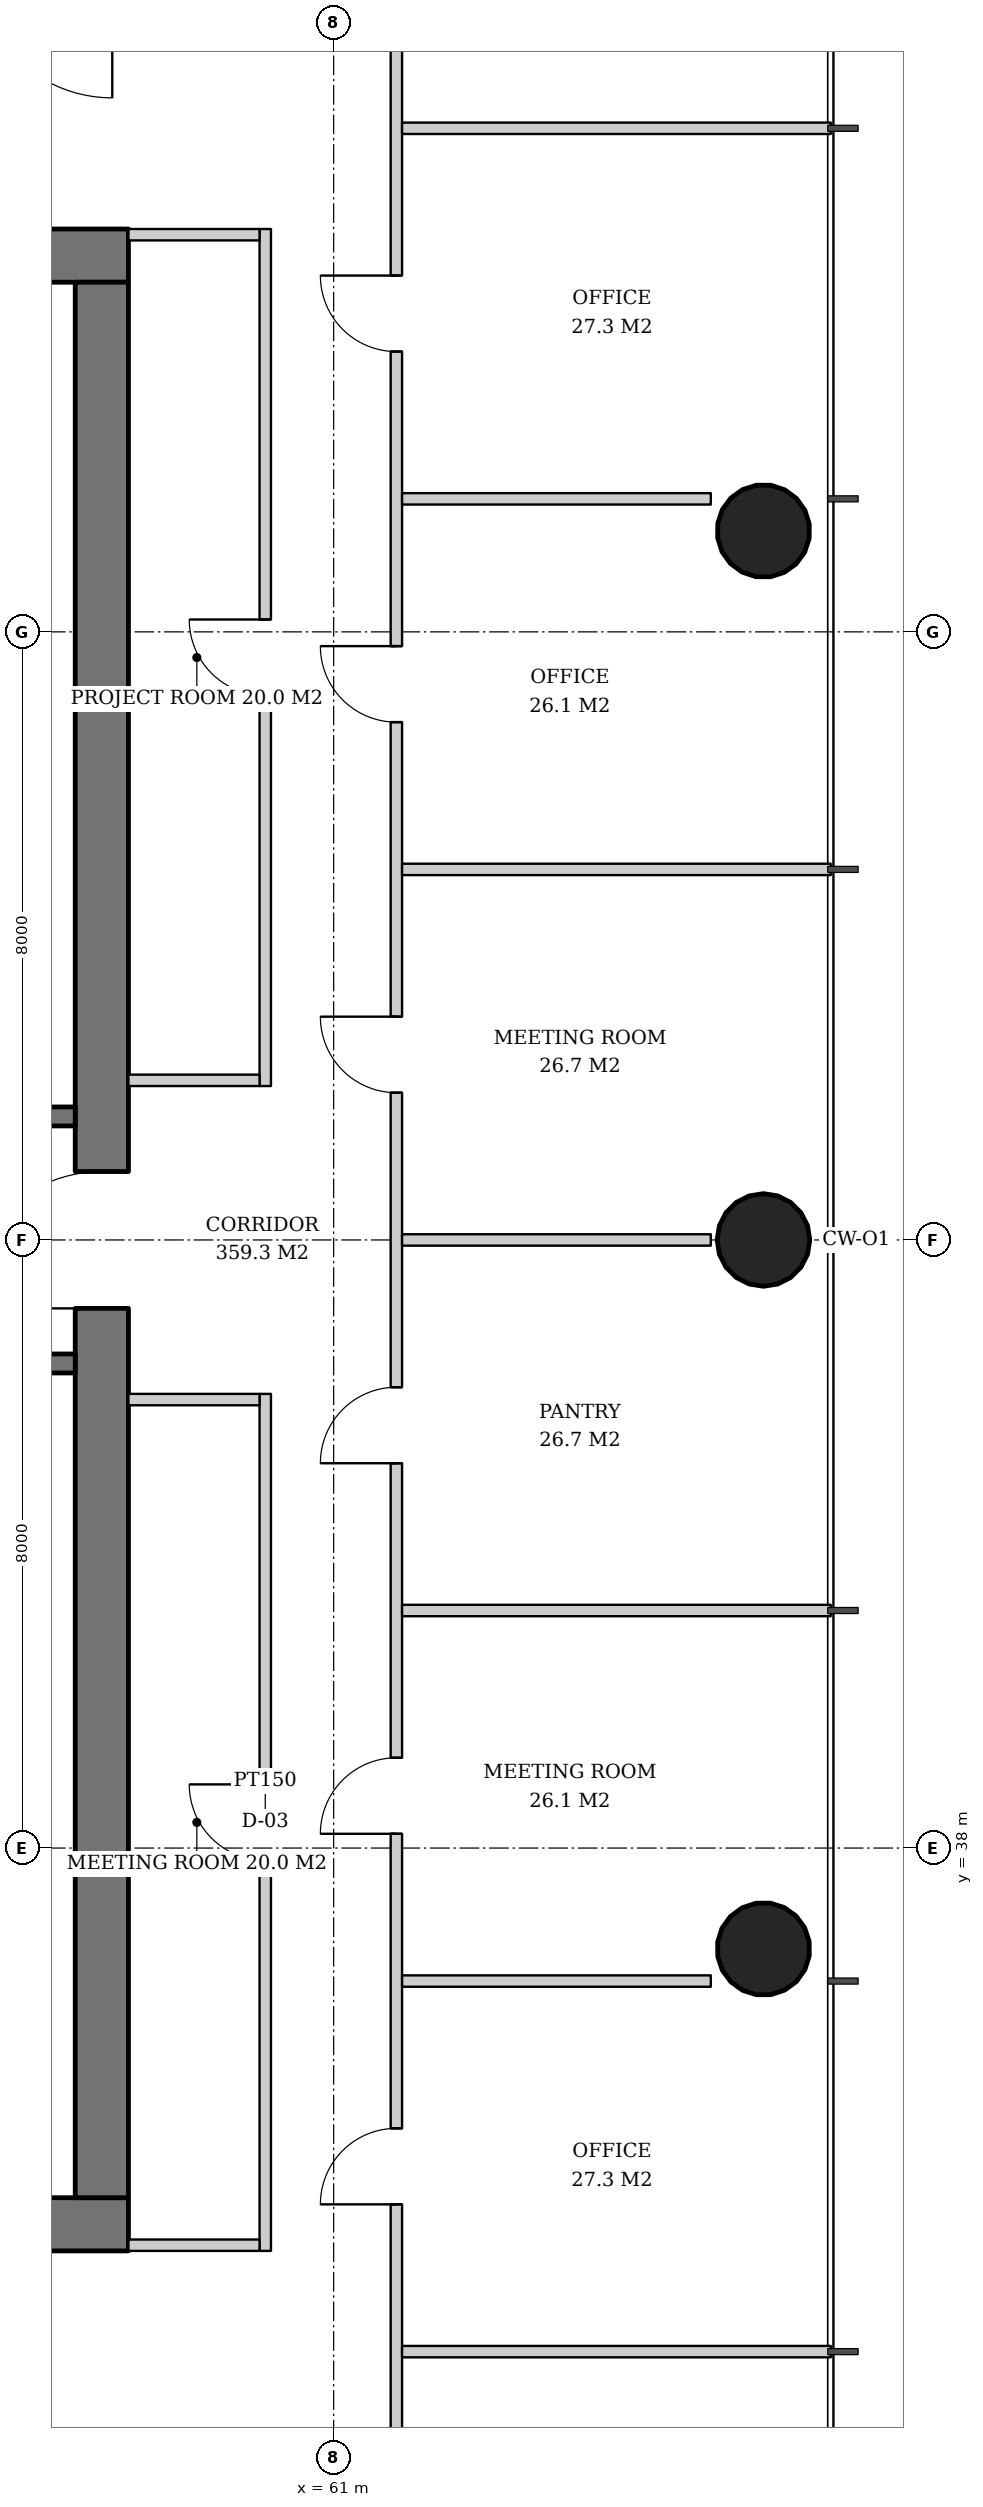
"""IFC4 building model, lengths in metres.
Left out: names, types, materials, properties, quantities, classifications, styles, units other than length and angle.
Written with IfcOpenShell. Run it as: python <this file> out.ifc"""

import sys

from ifc_helpers import new_model, si_unit, direction, frame, frame_2d, origin, origin_2d, place, context, subcontext, project, spatial, rectangle, hollow_circle, extrude, element, fill, save


model = new_model("IFC4")
c1 = context("Model", 3, precision=1e-05, world=origin(), true_north=direction((0.0, 1.0)))
c2 = subcontext(c1, "Body", "Model", "MODEL_VIEW")
j1 = project(units=[si_unit("LENGTHUNIT", "METRE"), si_unit("PLANEANGLEUNIT", "RADIAN")], contexts=[c1])
p1 = place(None, origin())
s1 = spatial("IfcSite", under=j1, at=p1, CompositionType="ELEMENT")
p2 = place(p1, origin())
s2 = spatial("IfcBuilding", under=s1, at=p2, CompositionType="ELEMENT")
p3 = place(p2, frame((0.0, 0.0, 93.2)))
s3 = spatial("IfcBuildingStorey", under=s2, at=p3, CompositionType="ELEMENT", Elevation=93.2)
p4 = place(p3, frame((66.693, 36.654, 0.0), z_axis=(-0.031910269556, 0.015987237665, 0.999362868496), x_axis=(-0.447933021895, -0.894067115991, 0.0)))
e1 = element("IfcColumn", 1, at=p4, inside=s3, PredefinedType="COLUMN", context=c2, shape_type="SweptSolid", body=[
    extrude(hollow_circle(Radius=0.61, WallThickness=0.04, at=origin_2d()), origin(), (0.0, 0.0, 1.0), 3.802),
])
p5 = place(p3, frame((66.693, 46.0, 0.0), z_axis=(-0.031914348339, 0.0, 0.999490607445), x_axis=(0.0, -1.0, 0.0)))
e2 = element("IfcColumn", 2, at=p5, inside=s3, PredefinedType="COLUMN", context=c2, shape_type="SweptSolid", body=[
    extrude(hollow_circle(Radius=0.61, WallThickness=0.04, at=origin_2d()), origin(), (0.0, 0.0, 1.0), 3.802),
])
p6 = place(p3, frame((66.693, 55.346, 0.0), z_axis=(-0.031910269556, -0.015987237665, 0.999362868496), x_axis=(0.447933021895, -0.894067115991, 0.0)))
e3 = element("IfcColumn", 3, at=p6, inside=s3, PredefinedType="COLUMN", context=c2, shape_type="SweptSolid", body=[
    extrude(hollow_circle(Radius=0.61, WallThickness=0.04, at=origin_2d()), origin(), (0.0, 0.0, 1.0), 3.802),
])
p7 = place(p3, frame((31.7, 33.05, 0.0), z_axis=(0.0, 0.0, 1.0), x_axis=(1.0, 0.0, 0.0)))
e4 = element("IfcWall", 4, at=p7, inside=s3, PredefinedType="SHEAR", context=c2, shape_type="SweptSolid", body=[
    extrude(rectangle(XDim=26.6, YDim=0.7, at=frame_2d((13.3, 0.0))), origin(), (0.0, 0.0, 1.0), 3.8),
])
p8 = place(p7, frame((7.3, 0.0, 0.0)))
e5 = element("IfcOpeningElement", 5, at=p8, cuts=e4, PredefinedType="OPENING", context=c2, shape_type="SweptSolid", body=[
    extrude(rectangle(XDim=1.0, YDim=2.1, at=frame_2d((0.5, 1.05))), frame((0.0, 0.36, 0.0), z_axis=(0.0, -1.0, 0.0), x_axis=(1.0, 0.0, 0.0)), (0.0, 0.0, 1.0), 0.72),
])
p9 = place(p7, frame((18.75, 0.0, 0.0)))
e6 = element("IfcOpeningElement", 6, at=p9, cuts=e4, PredefinedType="OPENING", context=c2, shape_type="SweptSolid", body=[
    extrude(rectangle(XDim=1.0, YDim=2.1, at=frame_2d((0.5, 1.05))), frame((0.0, 0.36, 0.0), z_axis=(0.0, -1.0, 0.0), x_axis=(1.0, 0.0, 0.0)), (0.0, 0.0, 1.0), 0.72),
])
p10 = place(p7, frame((1.85, 0.0, 0.0)))
e7 = element("IfcOpeningElement", 7, at=p10, cuts=e4, PredefinedType="OPENING", context=c2, shape_type="SweptSolid", body=[
    extrude(rectangle(XDim=1.0, YDim=2.1, at=frame_2d((0.5, 1.05))), frame((0.0, 0.36, 0.0), z_axis=(0.0, -1.0, 0.0), x_axis=(1.0, 0.0, 0.0)), (0.0, 0.0, 1.0), 0.72),
])
p11 = place(p7, frame((4.7, 0.0, 0.0)))
e8 = element("IfcOpeningElement", 8, at=p11, cuts=e4, PredefinedType="OPENING", context=c2, shape_type="SweptSolid", body=[
    extrude(rectangle(XDim=1.0, YDim=2.1, at=frame_2d((0.5, 1.05))), frame((0.0, 0.36, 0.0), z_axis=(0.0, -1.0, 0.0), x_axis=(1.0, 0.0, 0.0)), (0.0, 0.0, 1.0), 0.72),
])
p12 = place(p7, frame((12.44, 0.0, 0.0)))
e9 = element("IfcOpeningElement", 9, at=p12, cuts=e4, PredefinedType="OPENING", context=c2, shape_type="SweptSolid", body=[
    extrude(rectangle(XDim=1.0, YDim=2.1, at=frame_2d((0.5, 1.05))), frame((0.0, 0.36, 0.0), z_axis=(0.0, -1.0, 0.0), x_axis=(1.0, 0.0, 0.0)), (0.0, 0.0, 1.0), 0.72),
])
p13 = place(p7, frame((20.644, 0.0, 0.0)))
e10 = element("IfcOpeningElement", 10, at=p13, cuts=e4, PredefinedType="OPENING", context=c2, shape_type="SweptSolid", body=[
    extrude(rectangle(XDim=1.0, YDim=2.1, at=frame_2d((0.5, 1.05))), frame((0.0, 0.36, 0.0), z_axis=(0.0, -1.0, 0.0), x_axis=(1.0, 0.0, 0.0)), (0.0, 0.0, 1.0), 0.72),
])
p14 = place(p7, frame((23.544, 0.0, 0.0)))
e11 = element("IfcOpeningElement", 11, at=p14, cuts=e4, PredefinedType="OPENING", context=c2, shape_type="SweptSolid", body=[
    extrude(rectangle(XDim=1.0, YDim=2.1, at=frame_2d((0.5, 1.05))), frame((0.0, 0.36, 0.0), z_axis=(0.0, -1.0, 0.0), x_axis=(1.0, 0.0, 0.0)), (0.0, 0.0, 1.0), 0.72),
])
p15 = place(p3, frame((31.7, 58.95, 0.0), z_axis=(0.0, 0.0, 1.0), x_axis=(1.0, 0.0, 0.0)))
e12 = element("IfcWall", 12, at=p15, inside=s3, PredefinedType="SHEAR", context=c2, shape_type="SweptSolid", body=[
    extrude(rectangle(XDim=26.6, YDim=0.7, at=frame_2d((13.3, 0.0))), origin(), (0.0, 0.0, 1.0), 3.8),
])
p16 = place(p15, frame((17.94, 0.0, 0.0)))
e13 = element("IfcOpeningElement", 13, at=p16, cuts=e12, PredefinedType="OPENING", context=c2, shape_type="SweptSolid", body=[
    extrude(rectangle(XDim=1.0, YDim=2.1, at=frame_2d((0.5, 1.05))), frame((0.0, 0.36, 0.0), z_axis=(0.0, -1.0, 0.0), x_axis=(1.0, 0.0, 0.0)), (0.0, 0.0, 1.0), 0.72),
])
p17 = place(p15, frame((5.825, 0.0, 0.0)))
e14 = element("IfcOpeningElement", 14, at=p17, cuts=e12, PredefinedType="OPENING", context=c2, shape_type="SweptSolid", body=[
    extrude(rectangle(XDim=1.0, YDim=2.1, at=frame_2d((0.5, 1.05))), frame((0.0, 0.36, 0.0), z_axis=(0.0, -1.0, 0.0), x_axis=(1.0, 0.0, 0.0)), (0.0, 0.0, 1.0), 0.72),
])
p18 = place(p15, frame((2.587, 0.0, 0.0)))
e15 = element("IfcOpeningElement", 15, at=p18, cuts=e12, PredefinedType="OPENING", context=c2, shape_type="SweptSolid", body=[
    extrude(rectangle(XDim=1.0, YDim=2.1, at=frame_2d((0.5, 1.05))), frame((0.0, 0.36, 0.0), z_axis=(0.0, -1.0, 0.0), x_axis=(1.0, 0.0, 0.0)), (0.0, 0.0, 1.0), 0.72),
])
p19 = place(p15, frame((9.126, 0.0, 0.0)))
e16 = element("IfcOpeningElement", 16, at=p19, cuts=e12, PredefinedType="OPENING", context=c2, shape_type="SweptSolid", body=[
    extrude(rectangle(XDim=1.0, YDim=2.1, at=frame_2d((0.5, 1.05))), frame((0.0, 0.36, 0.0), z_axis=(0.0, -1.0, 0.0), x_axis=(1.0, 0.0, 0.0)), (0.0, 0.0, 1.0), 0.72),
])
p20 = place(p15, frame((14.029, 0.0, 0.0)))
e17 = element("IfcOpeningElement", 17, at=p20, cuts=e12, PredefinedType="OPENING", context=c2, shape_type="SweptSolid", body=[
    extrude(rectangle(XDim=1.0, YDim=2.1, at=frame_2d((0.5, 1.05))), frame((0.0, 0.36, 0.0), z_axis=(0.0, -1.0, 0.0), x_axis=(1.0, 0.0, 0.0)), (0.0, 0.0, 1.0), 0.72),
])
p21 = place(p15, frame((22.4, 0.0, 0.0)))
e18 = element("IfcOpeningElement", 18, at=p21, cuts=e12, PredefinedType="OPENING", context=c2, shape_type="SweptSolid", body=[
    extrude(rectangle(XDim=1.0, YDim=2.1, at=frame_2d((0.5, 1.05))), frame((0.0, 0.36, 0.0), z_axis=(0.0, -1.0, 0.0), x_axis=(1.0, 0.0, 0.0)), (0.0, 0.0, 1.0), 0.72),
])
p22 = place(p3, frame((57.95, 33.4, 0.0), z_axis=(0.0, 0.0, 1.0), x_axis=(0.0, 1.0, 0.0)))
e19 = element("IfcWall", 19, at=p22, inside=s3, PredefinedType="SHEAR", context=c2, shape_type="SweptSolid", body=[
    extrude(rectangle(XDim=25.2, YDim=0.7, at=frame_2d((12.6, 0.0))), origin(), (0.0, 0.0, 1.0), 3.8),
])
p23 = place(p22, frame((11.7, 0.0, 0.0)))
e20 = element("IfcOpeningElement", 20, at=p23, cuts=e19, PredefinedType="OPENING", context=c2, shape_type="SweptSolid", body=[
    extrude(rectangle(XDim=1.8, YDim=2.4, at=frame_2d((0.9, 1.2))), frame((0.0, 0.36, 0.0), z_axis=(0.0, -1.0, 0.0), x_axis=(1.0, 0.0, 0.0)), (0.0, 0.0, 1.0), 0.72),
])
for number, where, z_axis, x_axis in (
    (21, (54.9, 44.375, 0.0), (0.0, 0.0, 1.0), (1.0, 0.0, 0.0)),
    (22, (54.9, 47.625, 0.0), (0.0, 0.0, 1.0), (1.0, 0.0, 0.0)),
):
    element("IfcWall", number, at=place(p3, frame(where, z_axis=z_axis, x_axis=x_axis)), inside=s3, PredefinedType="SOLIDWALL", context=c2, shape_type="SweptSolid", body=[
        extrude(rectangle(XDim=2.7, YDim=0.25, at=frame_2d((1.35, 0.0))), origin(), (0.0, 0.0, 1.0), 3.62),
    ])
p24 = place(p3, frame((60.1, 32.7, 0.0), z_axis=(0.0, 0.0, 1.0), x_axis=(0.0, 1.0, 0.0)))
e23 = element("IfcWall", 23, at=p24, inside=s3, PredefinedType="PARTITIONING", context=c2, shape_type="SweptSolid", body=[
    extrude(rectangle(XDim=11.275, YDim=0.15, at=frame_2d((5.638, 0.0))), origin(), (0.0, 0.0, 1.0), 2.72),
])
p25 = place(p24, frame((5.137, 0.0, 0.0)))
e24 = element("IfcOpeningElement", 24, at=p25, cuts=e23, PredefinedType="OPENING", context=c2, shape_type="SweptSolid", body=[
    extrude(rectangle(XDim=1.0, YDim=2.1, at=frame_2d((0.5, 1.05))), frame((0.0, 0.085, 0.0), z_axis=(0.0, -1.0, 0.0), x_axis=(1.0, 0.0, 0.0)), (0.0, 0.0, 1.0), 0.17),
])
for number, where, z_axis, x_axis in (
    (25, (58.3, 32.775, 0.0), (0.0, 0.0, 1.0), (1.0, 0.0, 0.0)),
    (26, (58.3, 43.9, 0.0), (0.0, 0.0, 1.0), (1.0, 0.0, 0.0)),
):
    element("IfcWall", number, at=place(p3, frame(where, z_axis=z_axis, x_axis=x_axis)), inside=s3, PredefinedType="PARTITIONING", context=c2, shape_type="SweptSolid", body=[
        extrude(rectangle(XDim=1.725, YDim=0.15, at=frame_2d((0.862, 0.0))), origin(), (0.0, 0.0, 1.0), 3.62),
    ])
p26 = place(p3, frame((60.1, 48.025, 0.0), z_axis=(0.0, 0.0, 1.0), x_axis=(0.0, 1.0, 0.0)))
e27 = element("IfcWall", 27, at=p26, inside=s3, PredefinedType="PARTITIONING", context=c2, shape_type="SweptSolid", body=[
    extrude(rectangle(XDim=11.275, YDim=0.15, at=frame_2d((5.638, 0.0))), origin(), (0.0, 0.0, 1.0), 2.806),
])
p27 = place(p26, frame((5.137, 0.0, 0.0)))
e28 = element("IfcOpeningElement", 28, at=p27, cuts=e27, PredefinedType="OPENING", context=c2, shape_type="SweptSolid", body=[
    extrude(rectangle(XDim=1.0, YDim=2.1, at=frame_2d((0.5, 1.05))), frame((0.0, 0.085, 0.0), z_axis=(0.0, -1.0, 0.0), x_axis=(1.0, 0.0, 0.0)), (0.0, 0.0, 1.0), 0.17),
])
for number, where, z_axis, x_axis in (
    (29, (58.3, 48.1, 0.0), (0.0, 0.0, 1.0), (1.0, 0.0, 0.0)),
    (30, (58.3, 59.225, 0.0), (0.0, 0.0, 1.0), (1.0, 0.0, 0.0)),
):
    element("IfcWall", number, at=place(p3, frame(where, z_axis=z_axis, x_axis=x_axis)), inside=s3, PredefinedType="PARTITIONING", context=c2, shape_type="SweptSolid", body=[
        extrude(rectangle(XDim=1.725, YDim=0.15, at=frame_2d((0.862, 0.0))), origin(), (0.0, 0.0, 1.0), 3.62),
    ])
p28 = place(p3, frame((61.825, 29.796, 0.0), z_axis=(0.0, 0.0, 1.0), x_axis=(0.0, 1.0, 0.0)))
e31 = element("IfcWall", 31, at=p28, inside=s3, PredefinedType="PARTITIONING", context=c2, shape_type="SweptSolid", body=[
    extrude(rectangle(XDim=32.409, YDim=0.15, at=frame_2d((16.204, 0.0))), origin(), (0.0, 0.0, 1.0), 2.72),
])
p29 = place(p28, frame((3.517, 0.0, 0.0)))
e32 = element("IfcOpeningElement", 32, at=p29, cuts=e31, PredefinedType="OPENING", context=c2, shape_type="SweptSolid", body=[
    extrude(rectangle(XDim=1.0, YDim=2.1, at=frame_2d((0.5, 1.05))), frame((0.0, 0.085, 0.0), z_axis=(0.0, -1.0, 0.0), x_axis=(1.0, 0.0, 0.0)), (0.0, 0.0, 1.0), 0.17),
])
p30 = place(p28, frame((8.392, 0.0, 0.0)))
e33 = element("IfcOpeningElement", 33, at=p30, cuts=e31, PredefinedType="OPENING", context=c2, shape_type="SweptSolid", body=[
    extrude(rectangle(XDim=1.0, YDim=2.1, at=frame_2d((0.5, 1.05))), frame((0.0, 0.085, 0.0), z_axis=(0.0, -1.0, 0.0), x_axis=(1.0, 0.0, 0.0)), (0.0, 0.0, 1.0), 0.17),
])
p31 = place(p28, frame((13.267, 0.0, 0.0)))
e34 = element("IfcOpeningElement", 34, at=p31, cuts=e31, PredefinedType="OPENING", context=c2, shape_type="SweptSolid", body=[
    extrude(rectangle(XDim=1.0, YDim=2.1, at=frame_2d((0.5, 1.05))), frame((0.0, 0.085, 0.0), z_axis=(0.0, -1.0, 0.0), x_axis=(1.0, 0.0, 0.0)), (0.0, 0.0, 1.0), 0.17),
])
p32 = place(p28, frame((18.142, 0.0, 0.0)))
e35 = element("IfcOpeningElement", 35, at=p32, cuts=e31, PredefinedType="OPENING", context=c2, shape_type="SweptSolid", body=[
    extrude(rectangle(XDim=1.0, YDim=2.1, at=frame_2d((0.5, 1.05))), frame((0.0, 0.085, 0.0), z_axis=(0.0, -1.0, 0.0), x_axis=(1.0, 0.0, 0.0)), (0.0, 0.0, 1.0), 0.17),
])
p33 = place(p28, frame((23.017, 0.0, 0.0)))
e36 = element("IfcOpeningElement", 36, at=p33, cuts=e31, PredefinedType="OPENING", context=c2, shape_type="SweptSolid", body=[
    extrude(rectangle(XDim=1.0, YDim=2.1, at=frame_2d((0.5, 1.05))), frame((0.0, 0.085, 0.0), z_axis=(0.0, -1.0, 0.0), x_axis=(1.0, 0.0, 0.0)), (0.0, 0.0, 1.0), 0.17),
])
p34 = place(p28, frame((27.892, 0.0, 0.0)))
e37 = element("IfcOpeningElement", 37, at=p34, cuts=e31, PredefinedType="OPENING", context=c2, shape_type="SweptSolid", body=[
    extrude(rectangle(XDim=1.0, YDim=2.1, at=frame_2d((0.5, 1.05))), frame((0.0, 0.085, 0.0), z_axis=(0.0, -1.0, 0.0), x_axis=(1.0, 0.0, 0.0)), (0.0, 0.0, 1.0), 0.17),
])
p35 = place(p3, frame((61.9, 31.375, 0.0), z_axis=(0.0, 0.0, 1.0), x_axis=(1.0, 0.0, 0.0)))
e38 = element("IfcWall", 38, at=p35, inside=s3, PredefinedType="PARTITIONING", context=c2, shape_type="SweptSolid", body=[
    extrude(rectangle(XDim=5.64, YDim=0.15, at=frame_2d((2.82, 0.0))), origin(), (0.0, 0.0, 1.0), 2.82),
])
p36 = place(p3, frame((61.9, 36.25, 0.0), z_axis=(0.0, 0.0, 1.0), x_axis=(1.0, 0.0, 0.0)))
e39 = element("IfcWall", 39, at=p36, inside=s3, PredefinedType="PARTITIONING", context=c2, shape_type="SweptSolid", body=[
    extrude(rectangle(XDim=4.062, YDim=0.15, at=frame_2d((2.031, 0.0))), origin(), (0.0, 0.0, 1.0), 3.62),
])
p37 = place(p3, frame((61.9, 41.125, 0.0), z_axis=(0.0, 0.0, 1.0), x_axis=(1.0, 0.0, 0.0)))
e40 = element("IfcWall", 40, at=p37, inside=s3, PredefinedType="PARTITIONING", context=c2, shape_type="SweptSolid", body=[
    extrude(rectangle(XDim=5.64, YDim=0.15, at=frame_2d((2.82, 0.0))), origin(), (0.0, 0.0, 1.0), 2.82),
])
p38 = place(p3, frame((61.9, 46.0, 0.0), z_axis=(0.0, 0.0, 1.0), x_axis=(1.0, 0.0, 0.0)))
e41 = element("IfcWall", 41, at=p38, inside=s3, PredefinedType="PARTITIONING", context=c2, shape_type="SweptSolid", body=[
    extrude(rectangle(XDim=4.062, YDim=0.15, at=frame_2d((2.031, 0.0))), origin(), (0.0, 0.0, 1.0), 2.858),
])
p39 = place(p3, frame((61.9, 50.875, 0.0), z_axis=(0.0, 0.0, 1.0), x_axis=(1.0, 0.0, 0.0)))
e42 = element("IfcWall", 42, at=p39, inside=s3, PredefinedType="PARTITIONING", context=c2, shape_type="SweptSolid", body=[
    extrude(rectangle(XDim=5.64, YDim=0.15, at=frame_2d((2.82, 0.0))), origin(), (0.0, 0.0, 1.0), 2.82),
])
p40 = place(p3, frame((61.9, 55.75, 0.0), z_axis=(0.0, 0.0, 1.0), x_axis=(1.0, 0.0, 0.0)))
e43 = element("IfcWall", 43, at=p40, inside=s3, PredefinedType="PARTITIONING", context=c2, shape_type="SweptSolid", body=[
    extrude(rectangle(XDim=4.062, YDim=0.15, at=frame_2d((2.031, 0.0))), origin(), (0.0, 0.0, 1.0), 3.62),
])
p41 = place(p3, frame((61.9, 60.625, 0.0), z_axis=(0.0, 0.0, 1.0), x_axis=(1.0, 0.0, 0.0)))
e44 = element("IfcWall", 44, at=p41, inside=s3, PredefinedType="PARTITIONING", context=c2, shape_type="SweptSolid", body=[
    extrude(rectangle(XDim=5.64, YDim=0.15, at=frame_2d((2.82, 0.0))), origin(), (0.0, 0.0, 1.0), 2.82),
])
p42 = place(p23, origin())
e45 = element("IfcDoor", 45, at=p42, inside=s3, OperationType="DOUBLE_DOOR_SINGLE_SWING", PredefinedType="DOOR", context=c2, shape_type="SweptSolid", body=[
    extrude(rectangle(XDim=1.8, YDim=2.4, at=frame_2d((0.9, 1.2))), frame((0.0, 0.025, 0.0), z_axis=(0.0, -1.0, 0.0), x_axis=(1.0, 0.0, 0.0)), (0.0, 0.0, 1.0), 0.05),
])
fill(e20, e45)
p43 = place(p25, origin())
e46 = element("IfcDoor", 46, at=p43, inside=s3, OperationType="SINGLE_SWING_RIGHT", PredefinedType="DOOR", context=c2, shape_type="SweptSolid", body=[
    extrude(rectangle(XDim=1.0, YDim=2.1, at=frame_2d((0.5, 1.05))), frame((0.0, 0.025, 0.0), z_axis=(0.0, -1.0, 0.0), x_axis=(1.0, 0.0, 0.0)), (0.0, 0.0, 1.0), 0.05),
])
fill(e24, e46)
p44 = place(p27, origin())
e47 = element("IfcDoor", 47, at=p44, inside=s3, OperationType="SINGLE_SWING_RIGHT", PredefinedType="DOOR", context=c2, shape_type="SweptSolid", body=[
    extrude(rectangle(XDim=1.0, YDim=2.1, at=frame_2d((0.5, 1.05))), frame((0.0, 0.025, 0.0), z_axis=(0.0, -1.0, 0.0), x_axis=(1.0, 0.0, 0.0)), (0.0, 0.0, 1.0), 0.05),
])
fill(e28, e47)
p45 = place(p29, origin())
e48 = element("IfcDoor", 48, at=p45, inside=s3, OperationType="SINGLE_SWING_LEFT", PredefinedType="DOOR", context=c2, shape_type="SweptSolid", body=[
    extrude(rectangle(XDim=1.0, YDim=2.1, at=frame_2d((0.5, 1.05))), frame((0.0, 0.025, 0.0), z_axis=(0.0, -1.0, 0.0), x_axis=(1.0, 0.0, 0.0)), (0.0, 0.0, 1.0), 0.05),
])
fill(e32, e48)
p46 = place(p30, origin())
e49 = element("IfcDoor", 49, at=p46, inside=s3, OperationType="SINGLE_SWING_LEFT", PredefinedType="DOOR", context=c2, shape_type="SweptSolid", body=[
    extrude(rectangle(XDim=1.0, YDim=2.1, at=frame_2d((0.5, 1.05))), frame((0.0, 0.025, 0.0), z_axis=(0.0, -1.0, 0.0), x_axis=(1.0, 0.0, 0.0)), (0.0, 0.0, 1.0), 0.05),
])
fill(e33, e49)
p47 = place(p31, origin())
e50 = element("IfcDoor", 50, at=p47, inside=s3, OperationType="SINGLE_SWING_LEFT", PredefinedType="DOOR", context=c2, shape_type="SweptSolid", body=[
    extrude(rectangle(XDim=1.0, YDim=2.1, at=frame_2d((0.5, 1.05))), frame((0.0, 0.025, 0.0), z_axis=(0.0, -1.0, 0.0), x_axis=(1.0, 0.0, 0.0)), (0.0, 0.0, 1.0), 0.05),
])
fill(e34, e50)
p48 = place(p32, origin())
e51 = element("IfcDoor", 51, at=p48, inside=s3, OperationType="SINGLE_SWING_RIGHT", PredefinedType="DOOR", context=c2, shape_type="SweptSolid", body=[
    extrude(rectangle(XDim=1.0, YDim=2.1, at=frame_2d((0.5, 1.05))), frame((0.0, 0.025, 0.0), z_axis=(0.0, -1.0, 0.0), x_axis=(1.0, 0.0, 0.0)), (0.0, 0.0, 1.0), 0.05),
])
fill(e35, e51)
p49 = place(p33, origin())
e52 = element("IfcDoor", 52, at=p49, inside=s3, OperationType="SINGLE_SWING_RIGHT", PredefinedType="DOOR", context=c2, shape_type="SweptSolid", body=[
    extrude(rectangle(XDim=1.0, YDim=2.1, at=frame_2d((0.5, 1.05))), frame((0.0, 0.025, 0.0), z_axis=(0.0, -1.0, 0.0), x_axis=(1.0, 0.0, 0.0)), (0.0, 0.0, 1.0), 0.05),
])
fill(e36, e52)
p50 = place(p34, origin())
e53 = element("IfcDoor", 53, at=p50, inside=s3, OperationType="SINGLE_SWING_RIGHT", PredefinedType="DOOR", context=c2, shape_type="SweptSolid", body=[
    extrude(rectangle(XDim=1.0, YDim=2.1, at=frame_2d((0.5, 1.05))), frame((0.0, 0.025, 0.0), z_axis=(0.0, -1.0, 0.0), x_axis=(1.0, 0.0, 0.0)), (0.0, 0.0, 1.0), 0.05),
])
fill(e37, e53)
save(model, sys.argv[1])
